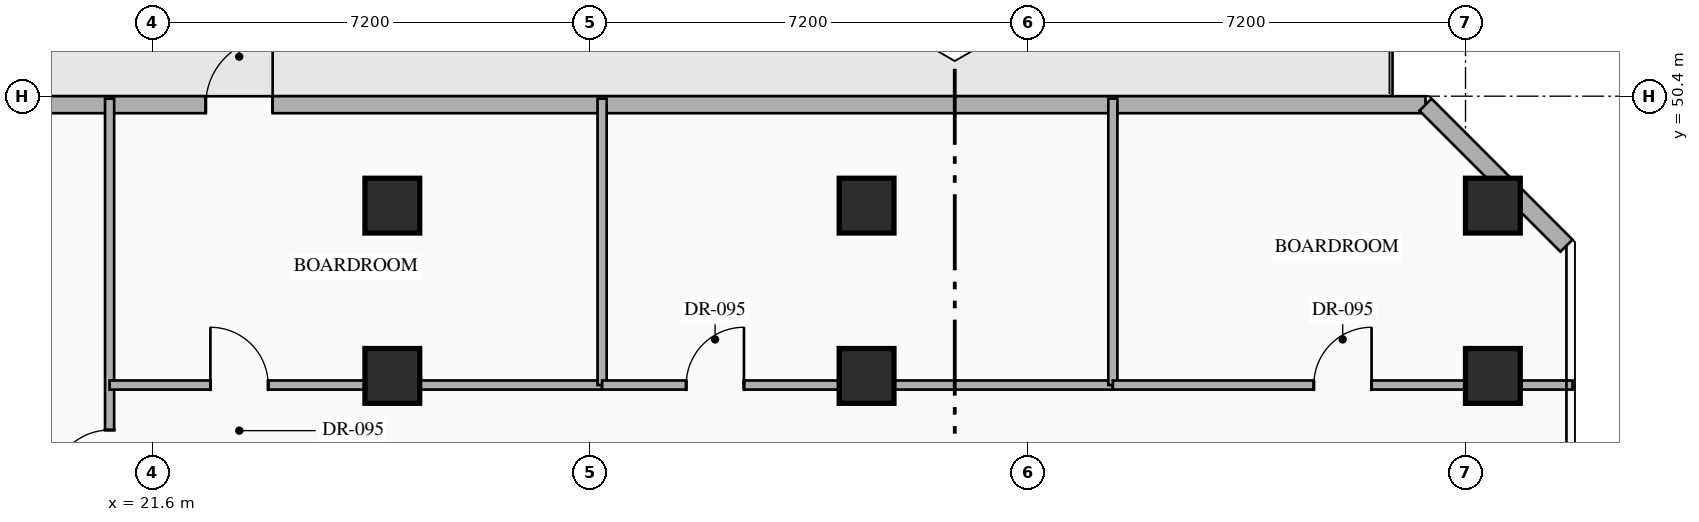
"""IFC4 building model, lengths in metres.
Left out: names, types, materials, properties, quantities, classifications, styles, units other than length and angle.
Written with IfcOpenShell. Run it as: python <this file> out.ifc"""

import sys

from ifc_helpers import new_model, si_unit, direction, frame, frame_2d, origin, origin_2d, place, context, subcontext, project, spatial, rectangle, hollow_rectangle, extrude, element, fill, save


model = new_model("IFC4")
c1 = context("Model", 3, precision=1e-05, world=origin(), true_north=direction((0.0, 1.0)))
c2 = subcontext(c1, "Body", "Model", "MODEL_VIEW")
j1 = project(units=[si_unit("LENGTHUNIT", "METRE"), si_unit("PLANEANGLEUNIT", "RADIAN")], contexts=[c1])
p1 = place(None, origin())
s1 = spatial("IfcSite", under=j1, at=p1, CompositionType="ELEMENT")
p2 = place(p1, origin())
s2 = spatial("IfcBuilding", under=s1, at=p2, CompositionType="ELEMENT")
p3 = place(p2, frame((0.0, 0.0, 101.25)))
s3 = spatial("IfcBuildingStorey", under=s2, at=p3, CompositionType="ELEMENT", Elevation=101.25)
for number, where, z_axis, x_axis in (
    (1, (25.55, 45.8, 0.0), (0.0, 0.0, 1.0), (1.0, 0.0, 0.0)),
    (2, (33.35, 45.8, 0.0), (0.0, 0.0, 1.0), (1.0, 0.0, 0.0)),
    (3, (43.65, 45.8, 0.0), (0.0, 0.0, 1.0), (1.0, 0.0, 0.0)),
    (4, (25.55, 48.6, 0.0), (0.0, 0.0, 1.0), (1.0, 0.0, 0.0)),
    (5, (33.35, 48.6, 0.0), (0.0, 0.0, 1.0), (1.0, 0.0, 0.0)),
    (6, (43.65, 48.6, 0.0), (0.0, 0.0, 1.0), (1.0, 0.0, 0.0)),
):
    element("IfcColumn", number, at=place(p3, frame(where, z_axis=z_axis, x_axis=x_axis)), inside=s3, PredefinedType="COLUMN", context=c2, shape_type="SweptSolid", body=[
        extrude(hollow_rectangle(XDim=0.9, YDim=0.9, WallThickness=0.036, at=origin_2d()), origin(), (0.0, 0.0, 1.0), 3.6),
    ])
p4 = place(p3, frame((12.058, 50.26, 0.0), z_axis=(0.0, 0.0, 1.0), x_axis=(1.0, 0.0, 0.0)))
e7 = element("IfcWall", 7, at=p4, inside=s3, PredefinedType="STANDARD", context=c2, shape_type="SweptSolid", body=[
    extrude(rectangle(XDim=30.484, YDim=0.28, at=frame_2d((15.242, 0.0))), origin(), (0.0, 0.0, 1.0), 3.35),
])
p5 = place(p4, frame((10.424, 0.0, 0.0)))
e8 = element("IfcOpeningElement", 8, at=p5, cuts=e7, PredefinedType="OPENING", context=c2, shape_type="SweptSolid", body=[
    extrude(rectangle(XDim=1.1, YDim=2.2, at=frame_2d((0.55, 1.1))), frame((0.0, 0.15, 0.0), z_axis=(0.0, -1.0, 0.0), x_axis=(1.0, 0.0, 0.0)), (0.0, 0.0, 1.0), 0.3),
])
p6 = place(p3, frame((42.542, 50.26, 0.0), z_axis=(0.0, 0.0, 1.0), x_axis=(0.707106781187, -0.707106781187, 0.0)))
e9 = element("IfcWall", 9, at=p6, inside=s3, PredefinedType="STANDARD", context=c2, shape_type="SweptSolid", body=[
    extrude(rectangle(XDim=3.278, YDim=0.28, at=frame_2d((1.639, 0.0))), origin(), (0.0, 0.0, 1.0), 3.35),
])
p7 = place(p3, frame((20.9, 40.2, 0.0), z_axis=(0.0, 0.0, 1.0), x_axis=(0.0, 1.0, 0.0)))
e10 = element("IfcWall", 10, at=p7, inside=s3, PredefinedType="PARTITIONING", context=c2, shape_type="SweptSolid", body=[
    extrude(rectangle(XDim=10.16, YDim=0.15, at=frame_2d((5.08, 0.0))), origin(), (0.0, 0.0, 1.0), 3.35),
])
p8 = place(p7, frame((3.76, 0.0, 0.0)))
e11 = element("IfcOpeningElement", 11, at=p8, cuts=e10, PredefinedType="OPENING", context=c2, shape_type="SweptSolid", body=[
    extrude(rectangle(XDim=0.95, YDim=2.15, at=frame_2d((0.475, 1.075))), frame((0.0, 0.085, 0.0), z_axis=(0.0, -1.0, 0.0), x_axis=(1.0, 0.0, 0.0)), (0.0, 0.0, 1.0), 0.17),
])
p9 = place(p3, frame((20.9, 45.65, 0.0), z_axis=(0.0, 0.0, 1.0), x_axis=(1.0, 0.0, 0.0)))
e12 = element("IfcWall", 12, at=p9, inside=s3, PredefinedType="PARTITIONING", context=c2, shape_type="SweptSolid", body=[
    extrude(rectangle(XDim=8.1, YDim=0.15, at=frame_2d((4.05, 0.0))), origin(), (0.0, 0.0, 1.0), 2.695),
])
p10 = place(p9, frame((1.658, 0.0, 0.0)))
e13 = element("IfcOpeningElement", 13, at=p10, cuts=e12, PredefinedType="OPENING", context=c2, shape_type="SweptSolid", body=[
    extrude(rectangle(XDim=0.95, YDim=2.15, at=frame_2d((0.475, 1.075))), frame((0.0, 0.085, 0.0), z_axis=(0.0, -1.0, 0.0), x_axis=(1.0, 0.0, 0.0)), (0.0, 0.0, 1.0), 0.17),
])
p11 = place(p3, frame((29.0, 45.65, 0.0), z_axis=(0.0, 0.0, 1.0), x_axis=(0.0, 1.0, 0.0)))
e14 = element("IfcWall", 14, at=p11, inside=s3, PredefinedType="PARTITIONING", context=c2, shape_type="SweptSolid", body=[
    extrude(rectangle(XDim=4.71, YDim=0.15, at=frame_2d((2.355, 0.0))), origin(), (0.0, 0.0, 1.0), 3.35),
])
p12 = place(p3, frame((29.0, 45.65, 0.0), z_axis=(0.0, 0.0, 1.0), x_axis=(1.0, 0.0, 0.0)))
e15 = element("IfcWall", 15, at=p12, inside=s3, PredefinedType="PARTITIONING", context=c2, shape_type="SweptSolid", body=[
    extrude(rectangle(XDim=8.4, YDim=0.15, at=frame_2d((4.2, 0.0))), origin(), (0.0, 0.0, 1.0), 2.695),
])
p13 = place(p12, frame((1.383, 0.0, 0.0)))
e16 = element("IfcOpeningElement", 16, at=p13, cuts=e15, PredefinedType="OPENING", context=c2, shape_type="SweptSolid", body=[
    extrude(rectangle(XDim=0.95, YDim=2.15, at=frame_2d((0.475, 1.075))), frame((0.0, 0.085, 0.0), z_axis=(0.0, -1.0, 0.0), x_axis=(1.0, 0.0, 0.0)), (0.0, 0.0, 1.0), 0.17),
])
p14 = place(p3, frame((37.4, 45.65, 0.0), z_axis=(0.0, 0.0, 1.0), x_axis=(0.0, 1.0, 0.0)))
e17 = element("IfcWall", 17, at=p14, inside=s3, PredefinedType="PARTITIONING", context=c2, shape_type="SweptSolid", body=[
    extrude(rectangle(XDim=4.71, YDim=0.15, at=frame_2d((2.355, 0.0))), origin(), (0.0, 0.0, 1.0), 3.35),
])
p15 = place(p3, frame((37.4, 45.65, 0.0), z_axis=(0.0, 0.0, 1.0), x_axis=(1.0, 0.0, 0.0)))
e18 = element("IfcWall", 18, at=p15, inside=s3, PredefinedType="PARTITIONING", context=c2, shape_type="SweptSolid", body=[
    extrude(rectangle(XDim=7.56, YDim=0.15, at=frame_2d((3.78, 0.0))), origin(), (0.0, 0.0, 1.0), 2.695),
])
p16 = place(p15, frame((3.305, 0.0, 0.0)))
e19 = element("IfcOpeningElement", 19, at=p16, cuts=e18, PredefinedType="OPENING", context=c2, shape_type="SweptSolid", body=[
    extrude(rectangle(XDim=0.95, YDim=2.15, at=frame_2d((0.475, 1.075))), frame((0.0, 0.085, 0.0), z_axis=(0.0, -1.0, 0.0), x_axis=(1.0, 0.0, 0.0)), (0.0, 0.0, 1.0), 0.17),
])
p17 = place(p5, origin())
e20 = element("IfcDoor", 20, at=p17, inside=s3, OperationType="SINGLE_SWING_RIGHT", PredefinedType="DOOR", context=c2, shape_type="SweptSolid", body=[
    extrude(rectangle(XDim=1.1, YDim=2.2, at=frame_2d((0.55, 1.1))), frame((0.0, 0.025, 0.0), z_axis=(0.0, -1.0, 0.0), x_axis=(1.0, 0.0, 0.0)), (0.0, 0.0, 1.0), 0.05),
])
fill(e8, e20)
p18 = place(p8, origin())
e21 = element("IfcDoor", 21, at=p18, inside=s3, OperationType="SINGLE_SWING_LEFT", PredefinedType="DOOR", context=c2, shape_type="SweptSolid", body=[
    extrude(rectangle(XDim=0.95, YDim=2.15, at=frame_2d((0.475, 1.075))), frame((0.0, 0.025, 0.0), z_axis=(0.0, -1.0, 0.0), x_axis=(1.0, 0.0, 0.0)), (0.0, 0.0, 1.0), 0.05),
])
fill(e11, e21)
p19 = place(p10, origin())
e22 = element("IfcDoor", 22, at=p19, inside=s3, OperationType="SINGLE_SWING_LEFT", PredefinedType="DOOR", context=c2, shape_type="SweptSolid", body=[
    extrude(rectangle(XDim=0.95, YDim=2.15, at=frame_2d((0.475, 1.075))), frame((0.0, 0.025, 0.0), z_axis=(0.0, -1.0, 0.0), x_axis=(1.0, 0.0, 0.0)), (0.0, 0.0, 1.0), 0.05),
])
fill(e13, e22)
p20 = place(p13, origin())
e23 = element("IfcDoor", 23, at=p20, inside=s3, OperationType="SINGLE_SWING_RIGHT", PredefinedType="DOOR", context=c2, shape_type="SweptSolid", body=[
    extrude(rectangle(XDim=0.95, YDim=2.15, at=frame_2d((0.475, 1.075))), frame((0.0, 0.025, 0.0), z_axis=(0.0, -1.0, 0.0), x_axis=(1.0, 0.0, 0.0)), (0.0, 0.0, 1.0), 0.05),
])
fill(e16, e23)
p21 = place(p16, origin())
e24 = element("IfcDoor", 24, at=p21, inside=s3, OperationType="SINGLE_SWING_RIGHT", PredefinedType="DOOR", context=c2, shape_type="SweptSolid", body=[
    extrude(rectangle(XDim=0.95, YDim=2.15, at=frame_2d((0.475, 1.075))), frame((0.0, 0.025, 0.0), z_axis=(0.0, -1.0, 0.0), x_axis=(1.0, 0.0, 0.0)), (0.0, 0.0, 1.0), 0.05),
])
fill(e19, e24)
save(model, sys.argv[1])
